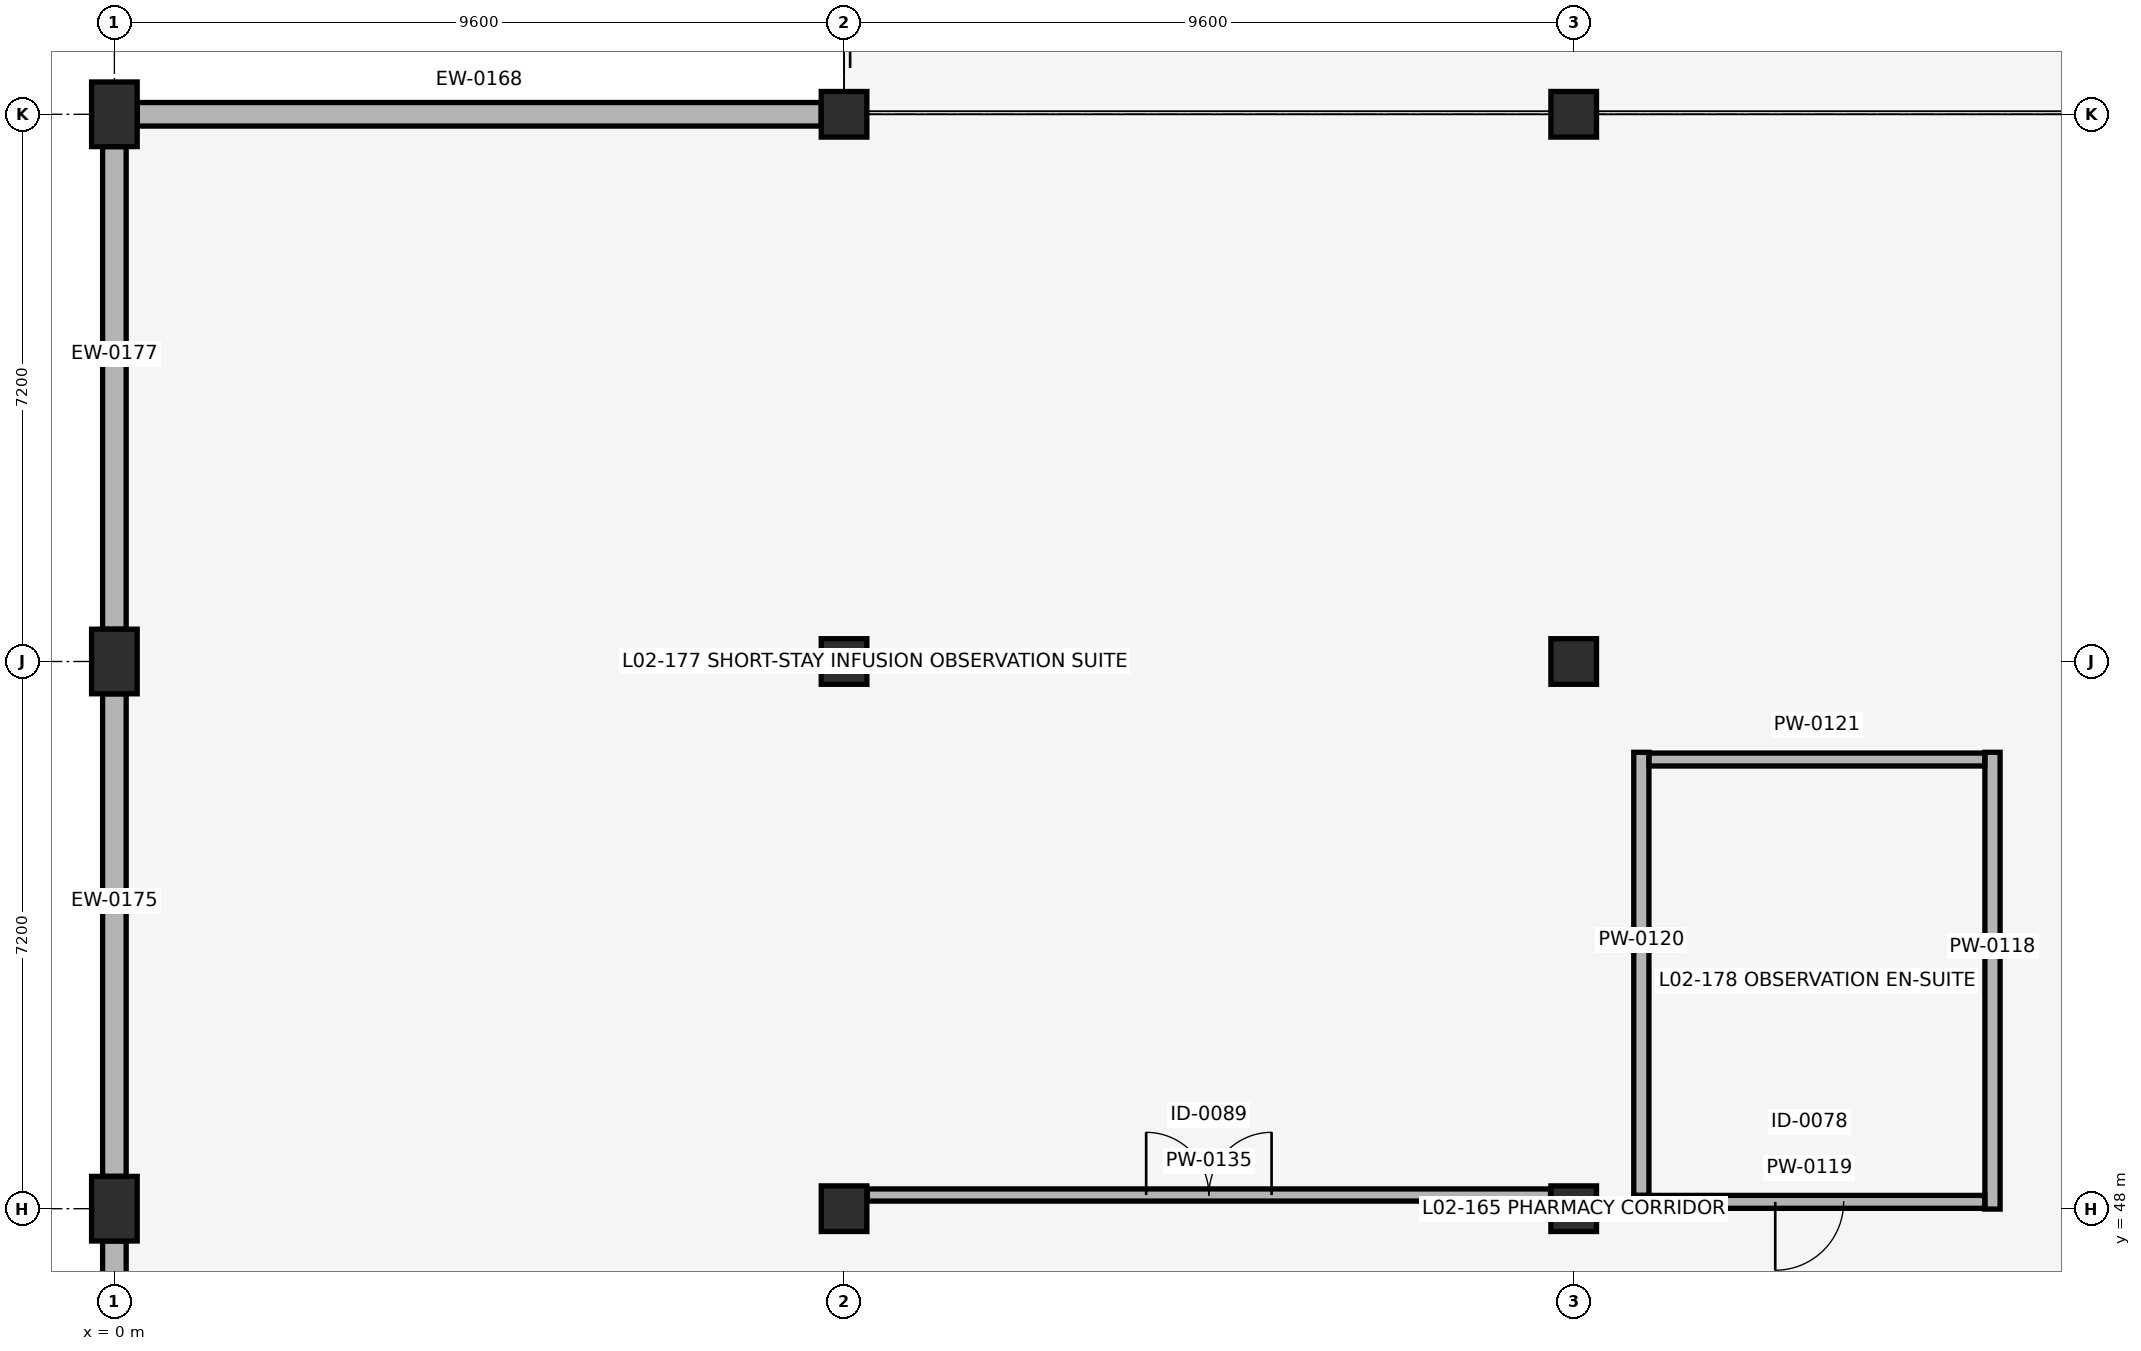
"""IFC4 building model, lengths in metres.
Left out: names, types, materials, properties, quantities, classifications, styles, units other than length and angle.
Written with IfcOpenShell. Run it as: python <this file> out.ifc"""

import sys

from ifc_helpers import new_model, si_unit, direction, frame, frame_2d, origin, origin_2d, place, context, subcontext, project, spatial, rectangle, extrude, element, fill, save


model = new_model("IFC4")
c1 = context("Model", 3, precision=1e-05, world=origin(), true_north=direction((0.0, 1.0)))
c2 = subcontext(c1, "Body", "Model", "MODEL_VIEW")
j1 = project(units=[si_unit("LENGTHUNIT", "METRE"), si_unit("PLANEANGLEUNIT", "RADIAN")], contexts=[c1])
p1 = place(None, origin())
s1 = spatial("IfcSite", under=j1, at=p1, CompositionType="ELEMENT")
p2 = place(p1, origin())
s2 = spatial("IfcBuilding", under=s1, at=p2, CompositionType="ELEMENT")
p3 = place(p2, frame((0.0, 0.0, 8.5)))
s3 = spatial("IfcBuildingStorey", under=s2, at=p3, CompositionType="ELEMENT", Elevation=8.5)
for number, where, z_axis, x_axis in (
    (1, (0.0, 48.0, 0.0), (0.0, 0.0, 1.0), (1.0, 0.0, 0.0)),
    (2, (0.0, 55.2, 0.0), (0.0, 0.0, 1.0), (1.0, 0.0, 0.0)),
    (3, (0.0, 62.4, 0.0), (0.0, 0.0, 1.0), (1.0, 0.0, 0.0)),
):
    element("IfcColumn", number, at=place(p3, frame(where, z_axis=z_axis, x_axis=x_axis)), inside=s3, PredefinedType="COLUMN", context=c2, shape_type="SweptSolid", body=[
        extrude(rectangle(XDim=0.6, YDim=0.85, at=origin_2d()), origin(), (0.0, 0.0, 1.0), 4.08),
    ])
for number, where, z_axis, x_axis in (
    (4, (9.6, 48.0, 0.0), (0.0, 0.0, 1.0), (1.0, 0.0, 0.0)),
    (5, (9.6, 55.2, 0.0), (0.0, 0.0, 1.0), (1.0, 0.0, 0.0)),
    (6, (9.6, 62.4, 0.0), (0.0, 0.0, 1.0), (1.0, 0.0, 0.0)),
    (7, (19.2, 48.0, 0.0), (0.0, 0.0, 1.0), (1.0, 0.0, 0.0)),
    (8, (19.2, 55.2, 0.0), (0.0, 0.0, 1.0), (1.0, 0.0, 0.0)),
    (9, (19.2, 62.4, 0.0), (0.0, 0.0, 1.0), (1.0, 0.0, 0.0)),
):
    element("IfcColumn", number, at=place(p3, frame(where, z_axis=z_axis, x_axis=x_axis)), inside=s3, PredefinedType="COLUMN", context=c2, shape_type="SweptSolid", body=[
        extrude(rectangle(XDim=0.6, YDim=0.6, at=origin_2d()), origin(), (0.0, 0.0, 1.0), 4.08),
    ])
p4 = place(p3, frame((9.3, 62.4, 0.0), z_axis=(0.0, 0.0, 1.0), x_axis=(-1.0, 0.0, 0.0)))
e10 = element("IfcWall", 10, at=p4, inside=s3, PredefinedType="SOLIDWALL", context=c2, shape_type="SweptSolid", body=[
    extrude(rectangle(XDim=9.0, YDim=0.31, at=frame_2d((4.5, 0.0))), origin(), (0.0, 0.0, 1.0), 3.06),
])
for number, where, z_axis, x_axis in (
    (11, (0.0, 47.575, 0.0), (0.0, 0.0, 1.0), (0.0, -1.0, 0.0)),
    (12, (0.0, 54.775, 0.0), (0.0, 0.0, 1.0), (0.0, -1.0, 0.0)),
):
    element("IfcWall", number, at=place(p3, frame(where, z_axis=z_axis, x_axis=x_axis)), inside=s3, PredefinedType="SOLIDWALL", context=c2, shape_type="SweptSolid", body=[
        extrude(rectangle(XDim=6.35, YDim=0.31, at=frame_2d((3.175, 0.0))), origin(), (0.0, 0.0, 1.0), 3.06),
    ])
p5 = place(p3, frame((0.0, 61.975, 0.0), z_axis=(0.0, 0.0, 1.0), x_axis=(0.0, -1.0, 0.0)))
e13 = element("IfcWall", 13, at=p5, inside=s3, PredefinedType="SOLIDWALL", context=c2, shape_type="SweptSolid", body=[
    extrude(rectangle(XDim=6.35, YDim=0.31, at=frame_2d((3.175, 0.0))), origin(), (0.0, 0.0, 1.0), 3.06),
])
p6 = place(p3, frame((24.71, 47.995, 0.0), z_axis=(0.0, 0.0, 1.0), x_axis=(0.0, 1.0, 0.0)))
e14 = element("IfcWall", 14, at=p6, inside=s3, PredefinedType="PLUMBINGWALL", context=c2, shape_type="SweptSolid", body=[
    extrude(rectangle(XDim=6.01, YDim=0.2, at=frame_2d((3.005, 0.0))), origin(), (0.0, 0.0, 1.0), 3.11),
])
p7 = place(p3, frame((19.995, 48.09, 0.0), z_axis=(0.0, 0.0, 1.0), x_axis=(1.0, 0.0, 0.0)))
e15 = element("IfcWall", 15, at=p7, inside=s3, PredefinedType="PLUMBINGWALL", context=c2, shape_type="SweptSolid", body=[
    extrude(rectangle(XDim=4.613, YDim=0.17, at=frame_2d((2.306, 0.0))), origin(), (0.0, 0.0, 1.0), 3.11),
])
p8 = place(p7, frame((1.856, 0.0, 0.0)))
e16 = element("IfcOpeningElement", 16, at=p8, cuts=e15, PredefinedType="OPENING", context=c2, shape_type="SweptSolid", body=[
    extrude(rectangle(XDim=0.9, YDim=2.06, at=frame_2d((0.45, 1.03))), frame((0.0, 0.095, 0.0), z_axis=(0.0, -1.0, 0.0), x_axis=(1.0, 0.0, 0.0)), (0.0, 0.0, 1.0), 0.19),
])
p9 = place(p3, frame((20.09, 48.177, 0.0), z_axis=(0.0, 0.0, 1.0), x_axis=(0.0, 1.0, 0.0)))
e17 = element("IfcWall", 17, at=p9, inside=s3, PredefinedType="PLUMBINGWALL", context=c2, shape_type="SweptSolid", body=[
    extrude(rectangle(XDim=5.828, YDim=0.2, at=frame_2d((2.914, 0.0))), origin(), (0.0, 0.0, 1.0), 3.11),
])
p10 = place(p3, frame((20.192, 53.91, 0.0), z_axis=(0.0, 0.0, 1.0), x_axis=(1.0, 0.0, 0.0)))
e18 = element("IfcWall", 18, at=p10, inside=s3, PredefinedType="PLUMBINGWALL", context=c2, shape_type="SweptSolid", body=[
    extrude(rectangle(XDim=4.416, YDim=0.17, at=frame_2d((2.208, 0.0))), origin(), (0.0, 0.0, 1.0), 3.12),
])
p11 = place(p3, frame((9.905, 48.18, 0.0), z_axis=(0.0, 0.0, 1.0), x_axis=(1.0, 0.0, 0.0)))
e19 = element("IfcWall", 19, at=p11, inside=s3, PredefinedType="PARTITIONING", context=c2, shape_type="SweptSolid", body=[
    extrude(rectangle(XDim=8.99, YDim=0.16, at=frame_2d((4.495, 0.0))), origin(), (0.0, 0.0, 1.0), 3.11),
])
p12 = place(p11, frame((3.67, 0.0, 0.0)))
e20 = element("IfcOpeningElement", 20, at=p12, cuts=e19, PredefinedType="OPENING", context=c2, shape_type="SweptSolid", body=[
    extrude(rectangle(XDim=1.65, YDim=2.15, at=frame_2d((0.825, 1.075))), frame((0.0, 0.09, 0.0), z_axis=(0.0, -1.0, 0.0), x_axis=(1.0, 0.0, 0.0)), (0.0, 0.0, 1.0), 0.18),
])
p13 = place(p8, origin())
e21 = element("IfcDoor", 21, at=p13, inside=s3, OperationType="SINGLE_SWING_RIGHT", PredefinedType="DOOR", context=c2, shape_type="SweptSolid", body=[
    extrude(rectangle(XDim=0.9, YDim=2.06, at=frame_2d((0.45, 1.03))), frame((0.0, 0.025, 0.0), z_axis=(0.0, -1.0, 0.0), x_axis=(1.0, 0.0, 0.0)), (0.0, 0.0, 1.0), 0.05),
])
fill(e16, e21)
p14 = place(p12, origin())
e22 = element("IfcDoor", 22, at=p14, inside=s3, OperationType="DOUBLE_DOOR_SINGLE_SWING", PredefinedType="DOOR", context=c2, shape_type="SweptSolid", body=[
    extrude(rectangle(XDim=1.65, YDim=2.15, at=frame_2d((0.825, 1.075))), frame((0.0, 0.025, 0.0), z_axis=(0.0, -1.0, 0.0), x_axis=(1.0, 0.0, 0.0)), (0.0, 0.0, 1.0), 0.05),
])
fill(e20, e22)
save(model, sys.argv[1])
